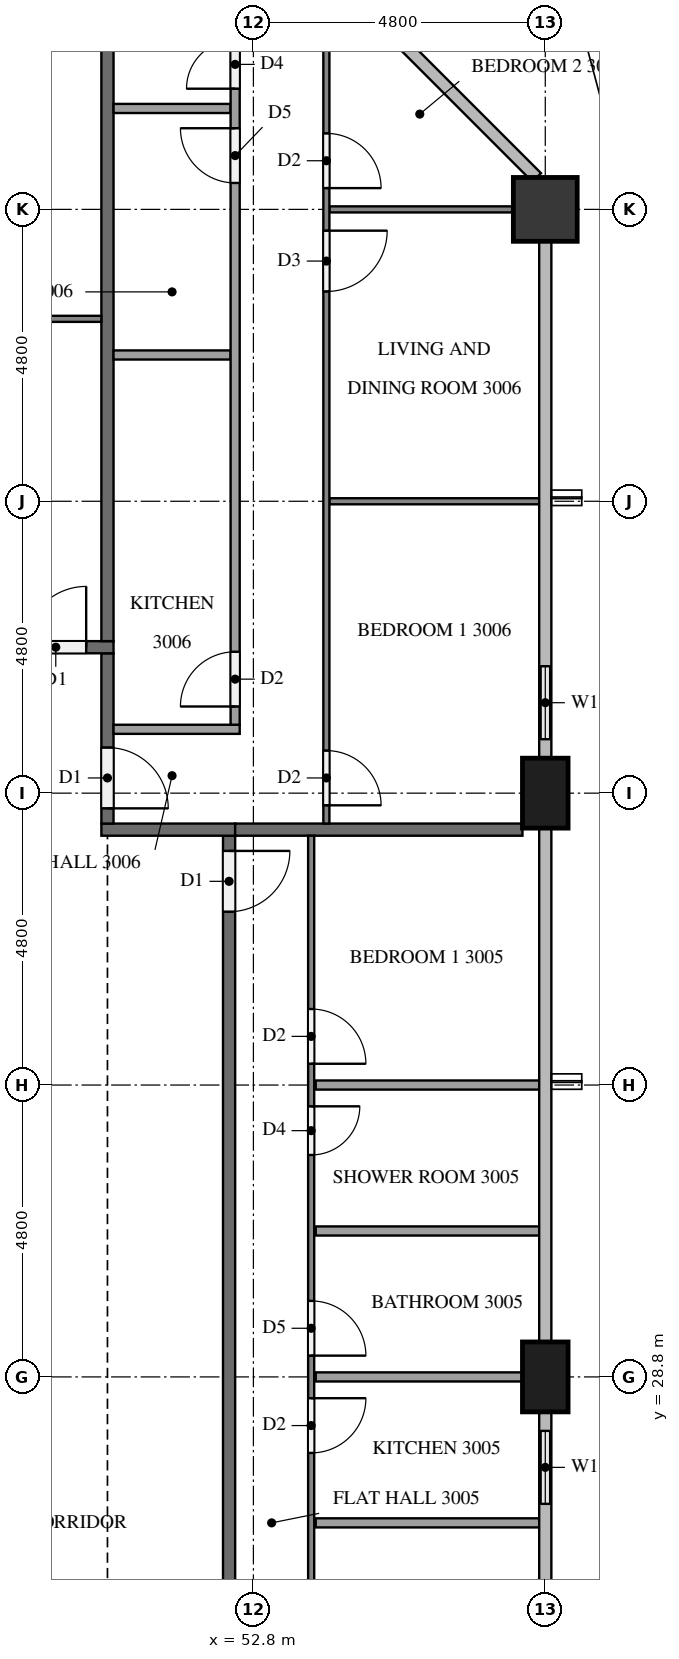
"""IFC4 building model, lengths in metres.
Left out: names, types, materials, properties, quantities, classifications, styles, units other than length and angle.
Written with IfcOpenShell. Run it as: python <this file> out.ifc"""

import sys

from ifc_helpers import new_model, si_unit, direction, frame, frame_2d, origin, origin_2d, place, context, subcontext, project, spatial, rectangle, extrude, element, fill, save


model = new_model("IFC4")
c1 = context("Model", 3, precision=1e-05, world=origin(), true_north=direction((0.0, 1.0)))
c2 = subcontext(c1, "Body", "Model", "MODEL_VIEW")
j1 = project(units=[si_unit("LENGTHUNIT", "METRE"), si_unit("PLANEANGLEUNIT", "RADIAN")], contexts=[c1])
p1 = place(None, origin())
s1 = spatial("IfcSite", under=j1, at=p1, CompositionType="ELEMENT")
p2 = place(p1, origin())
s2 = spatial("IfcBuilding", under=s1, at=p2, CompositionType="ELEMENT")
p3 = place(p2, frame((0.0, 0.0, 119.1)))
s3 = spatial("IfcBuildingStorey", under=s2, at=p3, CompositionType="ELEMENT", Elevation=119.1)
for number, where, z_axis, x_axis in (
    (1, (57.6, 28.8, 0.0), (0.0, 0.0, 1.0), (0.0, 1.0, 0.0)),
    (2, (57.6, 38.4, 0.0), (0.0, 0.0, 1.0), (0.0, 1.0, 0.0)),
):
    element("IfcColumn", number, at=place(p3, frame(where, z_axis=z_axis, x_axis=x_axis)), inside=s3, PredefinedType="COLUMN", context=c2, shape_type="SweptSolid", body=[
        extrude(rectangle(XDim=1.15, YDim=0.75, at=origin_2d()), origin(), (0.0, 0.0, 1.0), 3.2),
    ])
p4 = place(p3, frame((57.6, 48.0, 0.0), z_axis=(0.0, 0.0, 1.0), x_axis=(1.0, 0.0, 0.0)))
e3 = element("IfcColumn", 3, at=p4, inside=s3, PredefinedType="COLUMN", context=c2, shape_type="SweptSolid", body=[
    extrude(rectangle(XDim=1.05, YDim=1.05, at=origin_2d()), origin(), (0.0, 0.0, 1.0), 3.2),
])
p5 = place(p3, frame((57.6, 26.4, 0.0), z_axis=(0.0, 0.0, 1.0), x_axis=(0.0, 1.0, 0.0)))
e4 = element("IfcWall", 4, at=p5, inside=s3, PredefinedType="SOLIDWALL", context=c2, shape_type="SweptSolid", body=[
    extrude(rectangle(XDim=1.825, YDim=0.15, at=frame_2d((0.913, 0.0))), origin(), (0.0, 0.0, 1.0), 3.2),
])
p6 = place(p5, frame((0.312, 0.0, 0.9)))
e5 = element("IfcOpeningElement", 5, at=p6, cuts=e4, PredefinedType="OPENING", context=c2, shape_type="SweptSolid", body=[
    extrude(rectangle(XDim=1.2, YDim=1.4, at=frame_2d((0.6, 0.7))), frame((0.0, 0.085, 0.0), z_axis=(0.0, -1.0, 0.0), x_axis=(1.0, 0.0, 0.0)), (0.0, 0.0, 1.0), 0.17),
])
p7 = place(p3, frame((57.6, 38.975, 0.0), z_axis=(0.0, 0.0, 1.0), x_axis=(0.0, 1.0, 0.0)))
e6 = element("IfcWall", 6, at=p7, inside=s3, PredefinedType="SOLIDWALL", context=c2, shape_type="SweptSolid", body=[
    extrude(rectangle(XDim=1.825, YDim=0.15, at=frame_2d((0.913, 0.0))), origin(), (0.0, 0.0, 1.0), 3.2),
])
p8 = place(p7, frame((0.312, 0.0, 0.9)))
e7 = element("IfcOpeningElement", 7, at=p8, cuts=e6, PredefinedType="OPENING", context=c2, shape_type="SweptSolid", body=[
    extrude(rectangle(XDim=1.2, YDim=1.4, at=frame_2d((0.6, 0.7))), frame((0.0, 0.085, 0.0), z_axis=(0.0, -1.0, 0.0), x_axis=(1.0, 0.0, 0.0)), (0.0, 0.0, 1.0), 0.17),
])
p9 = place(p3, frame((52.4, 37.7, 0.0), z_axis=(0.0, 0.0, 1.0), x_axis=(0.0, -1.0, 0.0)))
e8 = element("IfcWall", 8, at=p9, inside=s3, PredefinedType="PARTITIONING", context=c2, shape_type="SweptSolid", body=[
    extrude(rectangle(XDim=22.6, YDim=0.2, at=frame_2d((11.3, 0.0))), origin(), (0.0, 0.0, 1.0), 3.2),
])
p10 = place(p9, frame((0.25, 0.0, 0.0)))
e9 = element("IfcOpeningElement", 9, at=p10, cuts=e8, PredefinedType="OPENING", context=c2, shape_type="SweptSolid", body=[
    extrude(rectangle(XDim=1.0, YDim=2.1, at=frame_2d((0.5, 1.05))), frame((0.0, 0.11, 0.0), z_axis=(0.0, -1.0, 0.0), x_axis=(1.0, 0.0, 0.0)), (0.0, 0.0, 1.0), 0.22),
])
p11 = place(p3, frame((52.5, 37.8, 0.0), z_axis=(0.0, 0.0, 1.0), x_axis=(-1.0, 0.0, 0.0)))
e10 = element("IfcWall", 10, at=p11, inside=s3, PredefinedType="PARTITIONING", context=c2, shape_type="SweptSolid", body=[
    extrude(rectangle(XDim=2.2, YDim=0.2, at=frame_2d((1.1, 0.0))), origin(), (0.0, 0.0, 1.0), 3.2),
])
p12 = place(p3, frame((50.4, 40.7, 0.0), z_axis=(0.0, 0.0, 1.0), x_axis=(0.0, -1.0, 0.0)))
e11 = element("IfcWall", 11, at=p12, inside=s3, PredefinedType="PARTITIONING", context=c2, shape_type="SweptSolid", body=[
    extrude(rectangle(XDim=2.8, YDim=0.2, at=frame_2d((1.4, 0.0))), origin(), (0.0, 0.0, 1.0), 3.2),
])
p13 = place(p12, frame((1.55, 0.0, 0.0)))
e12 = element("IfcOpeningElement", 12, at=p13, cuts=e11, PredefinedType="OPENING", context=c2, shape_type="SweptSolid", body=[
    extrude(rectangle(XDim=1.0, YDim=2.1, at=frame_2d((0.5, 1.05))), frame((0.0, 0.11, 0.0), z_axis=(0.0, -1.0, 0.0), x_axis=(1.0, 0.0, 0.0)), (0.0, 0.0, 1.0), 0.22),
])
p14 = place(p3, frame((11.9, 40.8, 0.0), z_axis=(0.0, 0.0, 1.0), x_axis=(1.0, 0.0, 0.0)))
e13 = element("IfcWall", 13, at=p14, inside=s3, PredefinedType="PARTITIONING", context=c2, shape_type="SweptSolid", body=[
    extrude(rectangle(XDim=38.6, YDim=0.2, at=frame_2d((19.3, 0.0))), origin(), (0.0, 0.0, 1.0), 3.2),
])
p15 = place(p14, frame((37.15, 0.0, 0.0)))
e14 = element("IfcOpeningElement", 14, at=p15, cuts=e13, PredefinedType="OPENING", context=c2, shape_type="SweptSolid", body=[
    extrude(rectangle(XDim=1.0, YDim=2.1, at=frame_2d((0.5, 1.05))), frame((0.0, 0.11, 0.0), z_axis=(0.0, -1.0, 0.0), x_axis=(1.0, 0.0, 0.0)), (0.0, 0.0, 1.0), 0.22),
])
p16 = place(p14, frame((27.55, 0.0, 0.0)))
e15 = element("IfcOpeningElement", 15, at=p16, cuts=e13, PredefinedType="OPENING", context=c2, shape_type="SweptSolid", body=[
    extrude(rectangle(XDim=1.0, YDim=2.1, at=frame_2d((0.5, 1.05))), frame((0.0, 0.11, 0.0), z_axis=(0.0, -1.0, 0.0), x_axis=(1.0, 0.0, 0.0)), (0.0, 0.0, 1.0), 0.22),
])
p17 = place(p14, frame((13.15, 0.0, 0.0)))
e16 = element("IfcOpeningElement", 16, at=p17, cuts=e13, PredefinedType="OPENING", context=c2, shape_type="SweptSolid", body=[
    extrude(rectangle(XDim=1.0, YDim=2.1, at=frame_2d((0.5, 1.05))), frame((0.0, 0.11, 0.0), z_axis=(0.0, -1.0, 0.0), x_axis=(1.0, 0.0, 0.0)), (0.0, 0.0, 1.0), 0.22),
])
p18 = place(p3, frame((52.5, 37.8, 0.0), z_axis=(0.0, 0.0, 1.0), x_axis=(1.0, 0.0, 0.0)))
e17 = element("IfcWall", 17, at=p18, inside=s3, PredefinedType="PARTITIONING", context=c2, shape_type="SweptSolid", body=[
    extrude(rectangle(XDim=4.725, YDim=0.2, at=frame_2d((2.363, 0.0))), origin(), (0.0, 0.0, 1.0), 3.2),
])
p19 = place(p3, frame((50.4, 40.9, 0.0), z_axis=(0.0, 0.0, 1.0), x_axis=(0.0, 1.0, 0.0)))
e18 = element("IfcWall", 18, at=p19, inside=s3, PredefinedType="PARTITIONING", context=c2, shape_type="SweptSolid", body=[
    extrude(rectangle(XDim=11.8, YDim=0.2, at=frame_2d((5.9, 0.0))), origin(), (0.0, 0.0, 1.0), 3.2),
])
for number, where, z_axis, x_axis in (
    (19, (53.825, 33.6, 0.0), (0.0, 0.0, 1.0), (1.0, 0.0, 0.0)),
    (20, (53.825, 31.2, 0.0), (0.0, 0.0, 1.0), (1.0, 0.0, 0.0)),
):
    element("IfcWall", number, at=place(p3, frame(where, z_axis=z_axis, x_axis=x_axis)), inside=s3, PredefinedType="PARTITIONING", context=c2, shape_type="SweptSolid", body=[
        extrude(rectangle(XDim=3.675, YDim=0.15, at=frame_2d((1.837, 0.0))), origin(), (0.0, 0.0, 1.0), 3.2),
    ])
p20 = place(p3, frame((53.825, 28.8, 0.0), z_axis=(0.0, 0.0, 1.0), x_axis=(1.0, 0.0, 0.0)))
e21 = element("IfcWall", 21, at=p20, inside=s3, PredefinedType="PARTITIONING", context=c2, shape_type="SweptSolid", body=[
    extrude(rectangle(XDim=3.4, YDim=0.15, at=frame_2d((1.7, 0.0))), origin(), (0.0, 0.0, 1.0), 3.2),
])
p21 = place(p3, frame((53.825, 26.4, 0.0), z_axis=(0.0, 0.0, 1.0), x_axis=(1.0, 0.0, 0.0)))
e22 = element("IfcWall", 22, at=p21, inside=s3, PredefinedType="PARTITIONING", context=c2, shape_type="SweptSolid", body=[
    extrude(rectangle(XDim=3.675, YDim=0.15, at=frame_2d((1.837, 0.0))), origin(), (0.0, 0.0, 1.0), 3.2),
])
p22 = place(p3, frame((53.75, 37.7, 0.0), z_axis=(0.0, 0.0, 1.0), x_axis=(0.0, -1.0, 0.0)))
e23 = element("IfcWall", 23, at=p22, inside=s3, PredefinedType="PARTITIONING", context=c2, shape_type="SweptSolid", body=[
    extrude(rectangle(XDim=22.6, YDim=0.1, at=frame_2d((11.3, 0.0))), origin(), (0.0, 0.0, 1.0), 3.2),
])
p23 = place(p22, frame((2.85, 0.0, 0.0)))
e24 = element("IfcOpeningElement", 24, at=p23, cuts=e23, PredefinedType="OPENING", context=c2, shape_type="SweptSolid", body=[
    extrude(rectangle(XDim=0.9, YDim=2.1, at=frame_2d((0.45, 1.05))), frame((0.0, 0.06, 0.0), z_axis=(0.0, -1.0, 0.0), x_axis=(1.0, 0.0, 0.0)), (0.0, 0.0, 1.0), 0.12),
])
p24 = place(p22, frame((4.45, 0.0, 0.0)))
e25 = element("IfcOpeningElement", 25, at=p24, cuts=e23, PredefinedType="OPENING", context=c2, shape_type="SweptSolid", body=[
    extrude(rectangle(XDim=0.8, YDim=2.1, at=frame_2d((0.4, 1.05))), frame((0.0, 0.06, 0.0), z_axis=(0.0, -1.0, 0.0), x_axis=(1.0, 0.0, 0.0)), (0.0, 0.0, 1.0), 0.12),
])
p25 = place(p22, frame((7.65, 0.0, 0.0)))
e26 = element("IfcOpeningElement", 26, at=p25, cuts=e23, PredefinedType="OPENING", context=c2, shape_type="SweptSolid", body=[
    extrude(rectangle(XDim=0.9, YDim=2.1, at=frame_2d((0.45, 1.05))), frame((0.0, 0.06, 0.0), z_axis=(0.0, -1.0, 0.0), x_axis=(1.0, 0.0, 0.0)), (0.0, 0.0, 1.0), 0.12),
])
p26 = place(p22, frame((9.25, 0.0, 0.0)))
e27 = element("IfcOpeningElement", 27, at=p26, cuts=e23, PredefinedType="OPENING", context=c2, shape_type="SweptSolid", body=[
    extrude(rectangle(XDim=0.9, YDim=2.1, at=frame_2d((0.45, 1.05))), frame((0.0, 0.06, 0.0), z_axis=(0.0, -1.0, 0.0), x_axis=(1.0, 0.0, 0.0)), (0.0, 0.0, 1.0), 0.12),
])
p27 = place(p22, frame((17.15, 0.0, 0.0)))
e28 = element("IfcOpeningElement", 28, at=p27, cuts=e23, PredefinedType="OPENING", context=c2, shape_type="SweptSolid", body=[
    extrude(rectangle(XDim=1.0, YDim=2.1, at=frame_2d((0.5, 1.05))), frame((0.0, 0.06, 0.0), z_axis=(0.0, -1.0, 0.0), x_axis=(1.0, 0.0, 0.0)), (0.0, 0.0, 1.0), 0.12),
])
p28 = place(p22, frame((18.85, 0.0, 0.0)))
e29 = element("IfcOpeningElement", 29, at=p28, cuts=e23, PredefinedType="OPENING", context=c2, shape_type="SweptSolid", body=[
    extrude(rectangle(XDim=0.9, YDim=2.1, at=frame_2d((0.45, 1.05))), frame((0.0, 0.06, 0.0), z_axis=(0.0, -1.0, 0.0), x_axis=(1.0, 0.0, 0.0)), (0.0, 0.0, 1.0), 0.12),
])
p29 = place(p3, frame((54.05, 43.2, 0.0), z_axis=(0.0, 0.0, 1.0), x_axis=(1.0, 0.0, 0.0)))
e30 = element("IfcWall", 30, at=p29, inside=s3, PredefinedType="PARTITIONING", context=c2, shape_type="SweptSolid", body=[
    extrude(rectangle(XDim=3.45, YDim=0.1, at=frame_2d((1.725, 0.0))), origin(), (0.0, 0.0, 1.0), 3.2),
])
p30 = place(p3, frame((54.05, 48.0, 0.0), z_axis=(0.0, 0.0, 1.0), x_axis=(1.0, 0.0, 0.0)))
e31 = element("IfcWall", 31, at=p30, inside=s3, PredefinedType="PARTITIONING", context=c2, shape_type="SweptSolid", body=[
    extrude(rectangle(XDim=3.025, YDim=0.1, at=frame_2d((1.512, 0.0))), origin(), (0.0, 0.0, 1.0), 3.2),
])
p31 = place(p3, frame((54.0, 52.378, 0.0), z_axis=(0.0, 0.0, 1.0), x_axis=(0.0, -1.0, 0.0)))
e32 = element("IfcWall", 32, at=p31, inside=s3, PredefinedType="PARTITIONING", context=c2, shape_type="SweptSolid", body=[
    extrude(rectangle(XDim=14.479, YDim=0.1, at=frame_2d((7.239, 0.0))), origin(), (0.0, 0.0, 1.0), 3.2),
])
p32 = place(p31, frame((13.279, 0.0, 0.0)))
e33 = element("IfcOpeningElement", 33, at=p32, cuts=e32, PredefinedType="OPENING", context=c2, shape_type="SweptSolid", body=[
    extrude(rectangle(XDim=0.9, YDim=2.1, at=frame_2d((0.45, 1.05))), frame((0.0, 0.06, 0.0), z_axis=(0.0, -1.0, 0.0), x_axis=(1.0, 0.0, 0.0)), (0.0, 0.0, 1.0), 0.12),
])
p33 = place(p31, frame((4.729, 0.0, 0.0)))
e34 = element("IfcOpeningElement", 34, at=p33, cuts=e32, PredefinedType="OPENING", context=c2, shape_type="SweptSolid", body=[
    extrude(rectangle(XDim=1.0, YDim=2.1, at=frame_2d((0.5, 1.05))), frame((0.0, 0.06, 0.0), z_axis=(0.0, -1.0, 0.0), x_axis=(1.0, 0.0, 0.0)), (0.0, 0.0, 1.0), 0.12),
])
p34 = place(p31, frame((3.128, 0.0, 0.0)))
e35 = element("IfcOpeningElement", 35, at=p34, cuts=e32, PredefinedType="OPENING", context=c2, shape_type="SweptSolid", body=[
    extrude(rectangle(XDim=0.9, YDim=2.1, at=frame_2d((0.45, 1.05))), frame((0.0, 0.06, 0.0), z_axis=(0.0, -1.0, 0.0), x_axis=(1.0, 0.0, 0.0)), (0.0, 0.0, 1.0), 0.12),
])
for number, where, z_axis, x_axis in (
    (36, (50.5, 45.606, 0.0), (0.0, 0.0, 1.0), (1.0, 0.0, 0.0)),
    (37, (50.5, 49.66, 0.0), (0.0, 0.0, 1.0), (1.0, 0.0, 0.0)),
):
    element("IfcWall", number, at=place(p3, frame(where, z_axis=z_axis, x_axis=x_axis)), inside=s3, PredefinedType="PARTITIONING", context=c2, shape_type="SweptSolid", body=[
        extrude(rectangle(XDim=1.925, YDim=0.15, at=frame_2d((0.962, 0.0))), origin(), (0.0, 0.0, 1.0), 3.2),
    ])
p35 = place(p3, frame((50.5, 39.45, 0.0), z_axis=(0.0, 0.0, 1.0), x_axis=(1.0, 0.0, 0.0)))
e38 = element("IfcWall", 38, at=p35, inside=s3, PredefinedType="PARTITIONING", context=c2, shape_type="SweptSolid", body=[
    extrude(rectangle(XDim=2.075, YDim=0.15, at=frame_2d((1.038, 0.0))), origin(), (0.0, 0.0, 1.0), 3.2),
])
p36 = place(p3, frame((52.5, 39.525, 0.0), z_axis=(0.0, 0.0, 1.0), x_axis=(0.0, 1.0, 0.0)))
e39 = element("IfcWall", 39, at=p36, inside=s3, PredefinedType="PARTITIONING", context=c2, shape_type="SweptSolid", body=[
    extrude(rectangle(XDim=12.75, YDim=0.15, at=frame_2d((6.375, 0.0))), origin(), (0.0, 0.0, 1.0), 3.2),
])
p37 = place(p36, frame((0.3, 0.0, 0.0)))
e40 = element("IfcOpeningElement", 40, at=p37, cuts=e39, PredefinedType="OPENING", context=c2, shape_type="SweptSolid", body=[
    extrude(rectangle(XDim=0.9, YDim=2.1, at=frame_2d((0.45, 1.05))), frame((0.0, 0.085, 0.0), z_axis=(0.0, -1.0, 0.0), x_axis=(1.0, 0.0, 0.0)), (0.0, 0.0, 1.0), 0.17),
])
p38 = place(p36, frame((8.91, 0.0, 0.0)))
e41 = element("IfcOpeningElement", 41, at=p38, cuts=e39, PredefinedType="OPENING", context=c2, shape_type="SweptSolid", body=[
    extrude(rectangle(XDim=0.9, YDim=2.1, at=frame_2d((0.45, 1.05))), frame((0.0, 0.085, 0.0), z_axis=(0.0, -1.0, 0.0), x_axis=(1.0, 0.0, 0.0)), (0.0, 0.0, 1.0), 0.17),
])
p39 = place(p36, frame((10.46, 0.0, 0.0)))
e42 = element("IfcOpeningElement", 42, at=p39, cuts=e39, PredefinedType="OPENING", context=c2, shape_type="SweptSolid", body=[
    extrude(rectangle(XDim=0.8, YDim=2.1, at=frame_2d((0.4, 1.05))), frame((0.0, 0.085, 0.0), z_axis=(0.0, -1.0, 0.0), x_axis=(1.0, 0.0, 0.0)), (0.0, 0.0, 1.0), 0.17),
])
p40 = place(p3, frame((40.9, 46.2, 0.0), z_axis=(0.0, 0.0, 1.0), x_axis=(1.0, 0.0, 0.0)))
e43 = element("IfcWall", 43, at=p40, inside=s3, PredefinedType="PARTITIONING", context=c2, shape_type="SweptSolid", body=[
    extrude(rectangle(XDim=9.4, YDim=0.1, at=frame_2d((4.7, 0.0))), origin(), (0.0, 0.0, 1.0), 3.2),
])
p41 = place(p40, frame((5.05, 0.0, 0.0)))
e44 = element("IfcOpeningElement", 44, at=p41, cuts=e43, PredefinedType="OPENING", context=c2, shape_type="SweptSolid", body=[
    extrude(rectangle(XDim=1.0, YDim=2.1, at=frame_2d((0.5, 1.05))), frame((0.0, 0.06, 0.0), z_axis=(0.0, -1.0, 0.0), x_axis=(1.0, 0.0, 0.0)), (0.0, 0.0, 1.0), 0.12),
])
p42 = place(p40, frame((3.45, 0.0, 0.0)))
e45 = element("IfcOpeningElement", 45, at=p42, cuts=e43, PredefinedType="OPENING", context=c2, shape_type="SweptSolid", body=[
    extrude(rectangle(XDim=0.9, YDim=2.1, at=frame_2d((0.45, 1.05))), frame((0.0, 0.06, 0.0), z_axis=(0.0, -1.0, 0.0), x_axis=(1.0, 0.0, 0.0)), (0.0, 0.0, 1.0), 0.12),
])
p43 = place(p6, origin())
e46 = element("IfcWindow", 46, at=p43, inside=s3, PartitioningType="SINGLE_PANEL", PredefinedType="WINDOW", context=c2, shape_type="SweptSolid", body=[
    extrude(rectangle(XDim=1.2, YDim=1.4, at=frame_2d((0.6, 0.7))), frame((0.0, 0.03, 0.0), z_axis=(0.0, -1.0, 0.0), x_axis=(1.0, 0.0, 0.0)), (0.0, 0.0, 1.0), 0.06),
])
fill(e5, e46)
p44 = place(p8, origin())
e47 = element("IfcWindow", 47, at=p44, inside=s3, PartitioningType="SINGLE_PANEL", PredefinedType="WINDOW", context=c2, shape_type="SweptSolid", body=[
    extrude(rectangle(XDim=1.2, YDim=1.4, at=frame_2d((0.6, 0.7))), frame((0.0, 0.03, 0.0), z_axis=(0.0, -1.0, 0.0), x_axis=(1.0, 0.0, 0.0)), (0.0, 0.0, 1.0), 0.06),
])
fill(e7, e47)
p45 = place(p10, origin())
e48 = element("IfcDoor", 48, at=p45, inside=s3, OperationType="SINGLE_SWING_LEFT", PredefinedType="DOOR", context=c2, shape_type="SweptSolid", body=[
    extrude(rectangle(XDim=1.0, YDim=2.1, at=frame_2d((0.5, 1.05))), frame((0.0, 0.025, 0.0), z_axis=(0.0, -1.0, 0.0), x_axis=(1.0, 0.0, 0.0)), (0.0, 0.0, 1.0), 0.05),
])
fill(e9, e48)
p46 = place(p13, origin())
e49 = element("IfcDoor", 49, at=p46, inside=s3, OperationType="SINGLE_SWING_RIGHT", PredefinedType="DOOR", context=c2, shape_type="SweptSolid", body=[
    extrude(rectangle(XDim=1.0, YDim=2.1, at=frame_2d((0.5, 1.05))), frame((0.0, 0.025, 0.0), z_axis=(0.0, -1.0, 0.0), x_axis=(1.0, 0.0, 0.0)), (0.0, 0.0, 1.0), 0.05),
])
fill(e12, e49)
p47 = place(p15, origin())
e50 = element("IfcDoor", 50, at=p47, inside=s3, OperationType="SINGLE_SWING_RIGHT", PredefinedType="DOOR", context=c2, shape_type="SweptSolid", body=[
    extrude(rectangle(XDim=1.0, YDim=2.1, at=frame_2d((0.5, 1.05))), frame((0.0, 0.025, 0.0), z_axis=(0.0, -1.0, 0.0), x_axis=(1.0, 0.0, 0.0)), (0.0, 0.0, 1.0), 0.05),
])
fill(e14, e50)
p48 = place(p23, origin())
e51 = element("IfcDoor", 51, at=p48, inside=s3, OperationType="SINGLE_SWING_RIGHT", PredefinedType="DOOR", context=c2, shape_type="SweptSolid", body=[
    extrude(rectangle(XDim=0.9, YDim=2.1, at=frame_2d((0.45, 1.05))), frame((0.0, 0.025, 0.0), z_axis=(0.0, -1.0, 0.0), x_axis=(1.0, 0.0, 0.0)), (0.0, 0.0, 1.0), 0.05),
])
fill(e24, e51)
p49 = place(p24, origin())
e52 = element("IfcDoor", 52, at=p49, inside=s3, OperationType="SINGLE_SWING_LEFT", PredefinedType="DOOR", context=c2, shape_type="SweptSolid", body=[
    extrude(rectangle(XDim=0.8, YDim=2.1, at=frame_2d((0.4, 1.05))), frame((0.0, 0.025, 0.0), z_axis=(0.0, -1.0, 0.0), x_axis=(1.0, 0.0, 0.0)), (0.0, 0.0, 1.0), 0.05),
])
fill(e25, e52)
p50 = place(p25, origin())
e53 = element("IfcDoor", 53, at=p50, inside=s3, OperationType="SINGLE_SWING_RIGHT", PredefinedType="DOOR", context=c2, shape_type="SweptSolid", body=[
    extrude(rectangle(XDim=0.9, YDim=2.1, at=frame_2d((0.45, 1.05))), frame((0.0, 0.025, 0.0), z_axis=(0.0, -1.0, 0.0), x_axis=(1.0, 0.0, 0.0)), (0.0, 0.0, 1.0), 0.05),
])
fill(e26, e53)
p51 = place(p26, origin())
e54 = element("IfcDoor", 54, at=p51, inside=s3, OperationType="SINGLE_SWING_LEFT", PredefinedType="DOOR", context=c2, shape_type="SweptSolid", body=[
    extrude(rectangle(XDim=0.9, YDim=2.1, at=frame_2d((0.45, 1.05))), frame((0.0, 0.025, 0.0), z_axis=(0.0, -1.0, 0.0), x_axis=(1.0, 0.0, 0.0)), (0.0, 0.0, 1.0), 0.05),
])
fill(e27, e54)
p52 = place(p32, origin())
e55 = element("IfcDoor", 55, at=p52, inside=s3, OperationType="SINGLE_SWING_RIGHT", PredefinedType="DOOR", context=c2, shape_type="SweptSolid", body=[
    extrude(rectangle(XDim=0.9, YDim=2.1, at=frame_2d((0.45, 1.05))), frame((0.0, 0.025, 0.0), z_axis=(0.0, -1.0, 0.0), x_axis=(1.0, 0.0, 0.0)), (0.0, 0.0, 1.0), 0.05),
])
fill(e33, e55)
p53 = place(p33, origin())
e56 = element("IfcDoor", 56, at=p53, inside=s3, OperationType="SINGLE_SWING_LEFT", PredefinedType="DOOR", context=c2, shape_type="SweptSolid", body=[
    extrude(rectangle(XDim=1.0, YDim=2.1, at=frame_2d((0.5, 1.05))), frame((0.0, 0.025, 0.0), z_axis=(0.0, -1.0, 0.0), x_axis=(1.0, 0.0, 0.0)), (0.0, 0.0, 1.0), 0.05),
])
fill(e34, e56)
p54 = place(p34, origin())
e57 = element("IfcDoor", 57, at=p54, inside=s3, OperationType="SINGLE_SWING_RIGHT", PredefinedType="DOOR", context=c2, shape_type="SweptSolid", body=[
    extrude(rectangle(XDim=0.9, YDim=2.1, at=frame_2d((0.45, 1.05))), frame((0.0, 0.025, 0.0), z_axis=(0.0, -1.0, 0.0), x_axis=(1.0, 0.0, 0.0)), (0.0, 0.0, 1.0), 0.05),
])
fill(e35, e57)
p55 = place(p37, origin())
e58 = element("IfcDoor", 58, at=p55, inside=s3, OperationType="SINGLE_SWING_LEFT", PredefinedType="DOOR", context=c2, shape_type="SweptSolid", body=[
    extrude(rectangle(XDim=0.9, YDim=2.1, at=frame_2d((0.45, 1.05))), frame((0.0, 0.025, 0.0), z_axis=(0.0, -1.0, 0.0), x_axis=(1.0, 0.0, 0.0)), (0.0, 0.0, 1.0), 0.05),
])
fill(e40, e58)
p56 = place(p38, origin())
e59 = element("IfcDoor", 59, at=p56, inside=s3, OperationType="SINGLE_SWING_RIGHT", PredefinedType="DOOR", context=c2, shape_type="SweptSolid", body=[
    extrude(rectangle(XDim=0.9, YDim=2.1, at=frame_2d((0.45, 1.05))), frame((0.0, 0.025, 0.0), z_axis=(0.0, -1.0, 0.0), x_axis=(1.0, 0.0, 0.0)), (0.0, 0.0, 1.0), 0.05),
])
fill(e41, e59)
p57 = place(p39, origin())
e60 = element("IfcDoor", 60, at=p57, inside=s3, OperationType="SINGLE_SWING_LEFT", PredefinedType="DOOR", context=c2, shape_type="SweptSolid", body=[
    extrude(rectangle(XDim=0.8, YDim=2.1, at=frame_2d((0.4, 1.05))), frame((0.0, 0.025, 0.0), z_axis=(0.0, -1.0, 0.0), x_axis=(1.0, 0.0, 0.0)), (0.0, 0.0, 1.0), 0.05),
])
fill(e42, e60)
save(model, sys.argv[1])
